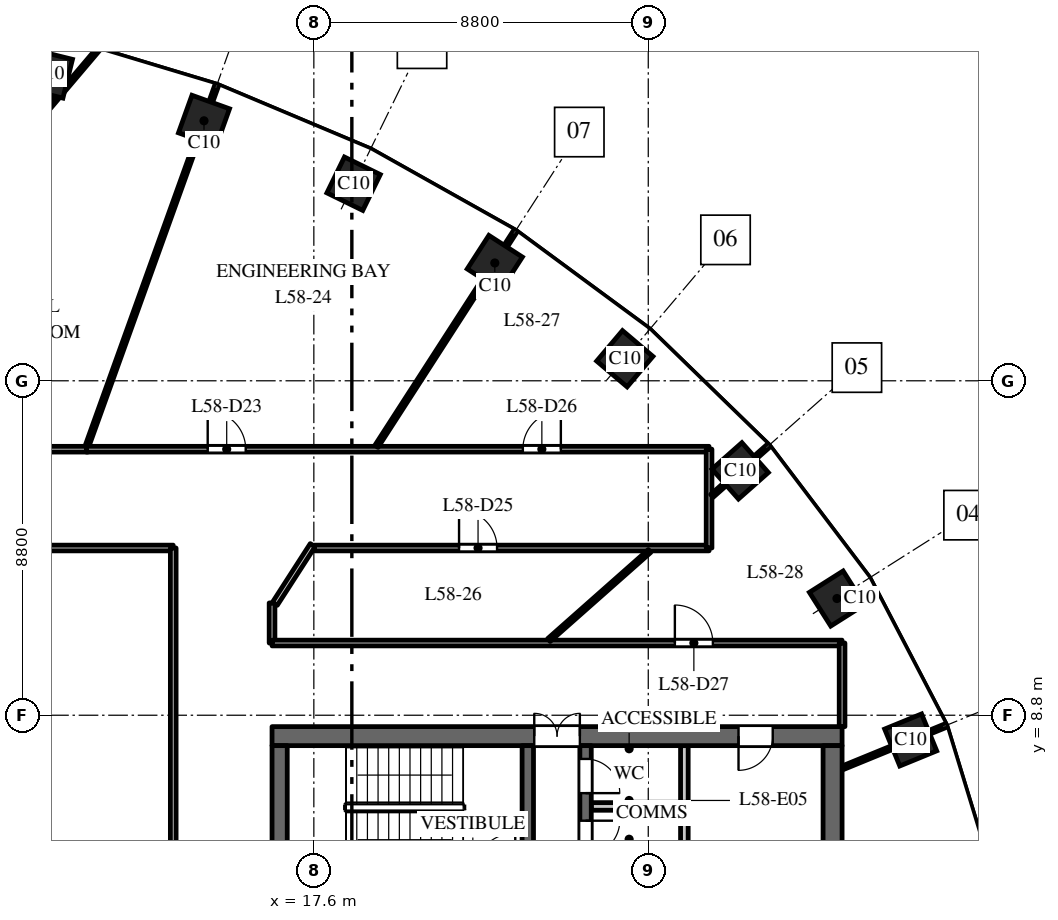
"""IFC4 building model, lengths in metres.
Left out: names, types, materials, properties, quantities, classifications, styles, units other than length and angle.
Written with IfcOpenShell. Run it as: python <this file> out.ifc"""

import sys

from ifc_helpers import new_model, si_unit, direction, frame, frame_2d, origin, origin_2d, place, context, subcontext, project, spatial, rectangle, extrude, element, fill, save


model = new_model("IFC4")
c1 = context("Model", 3, precision=1e-05, world=origin(), true_north=direction((0.0, 1.0)))
c2 = subcontext(c1, "Body", "Model", "MODEL_VIEW")
j1 = project(units=[si_unit("LENGTHUNIT", "METRE"), si_unit("PLANEANGLEUNIT", "RADIAN")], contexts=[c1])
p1 = place(None, origin())
s1 = spatial("IfcSite", under=j1, at=p1, CompositionType="ELEMENT")
p2 = place(p1, origin())
s2 = spatial("IfcBuilding", under=s1, at=p2, CompositionType="ELEMENT")
p3 = place(p2, frame((0.0, 0.0, 273.5)))
s3 = spatial("IfcBuildingStorey", under=s2, at=p3, CompositionType="ELEMENT", Elevation=273.5)
for number, where, z_axis, x_axis in (
    (1, (33.305, 8.149, 0.0), (0.0, 0.0, 1.0), (-0.379, 0.925, 0.0)),
    (2, (31.365, 11.871, 0.0), (0.0, 0.0, 1.0), (-0.535, 0.845, 0.0)),
    (3, (28.819, 15.23, 0.0), (0.0, 0.0, 1.0), (-0.663, 0.749, 0.0)),
    (4, (25.783, 18.18, 0.0), (0.0, 0.0, 1.0), (-0.763, 0.646, 0.0)),
    (5, (22.362, 20.7, 0.0), (0.0, 0.0, 1.0), (-0.84, 0.542, 0.0)),
    (6, (18.646, 22.785, 0.0), (0.0, 0.0, 1.0), (-0.898, 0.439, 0.0)),
    (7, (14.709, 24.441, 0.0), (0.0, 0.0, 1.0), (-0.941, 0.338, 0.0)),
    (8, (10.613, 25.674, 0.0), (0.0, 0.0, 1.0), (-0.971, 0.24, 0.0)),
):
    element("IfcColumn", number, at=place(p3, frame(where, z_axis=z_axis, x_axis=x_axis)), inside=s3, PredefinedType="COLUMN", context=c2, shape_type="SweptSolid", body=[
        extrude(rectangle(XDim=1.05, YDim=1.05, at=origin_2d()), origin(), (0.0, 0.0, 1.0), 4.0),
    ])
p4 = place(p3, frame((16.5, 8.25, 0.0), z_axis=(0.0, 0.0, 1.0), x_axis=(1.0, 0.0, 0.0)))
e9 = element("IfcWall", 9, at=p4, inside=s3, PredefinedType="SHEAR", context=c2, shape_type="SweptSolid", body=[
    extrude(rectangle(XDim=15.0, YDim=0.5, at=frame_2d((7.5, 0.0))), origin(), (0.0, 0.0, 1.0), 3.7),
])
p5 = place(p4, frame((6.9, 0.0, 0.0)))
e10 = element("IfcOpeningElement", 10, at=p5, cuts=e9, PredefinedType="OPENING", context=c2, shape_type="SweptSolid", body=[
    extrude(rectangle(XDim=1.2, YDim=2.1, at=frame_2d((0.6, 1.05))), frame((0.0, 0.26, 0.0), z_axis=(0.0, -1.0, 0.0), x_axis=(1.0, 0.0, 0.0)), (0.0, 0.0, 1.0), 0.52),
])
p6 = place(p4, frame((12.275, 0.0, 0.0)))
e11 = element("IfcOpeningElement", 11, at=p6, cuts=e9, PredefinedType="OPENING", context=c2, shape_type="SweptSolid", body=[
    extrude(rectangle(XDim=0.9, YDim=2.1, at=frame_2d((0.45, 1.05))), frame((0.0, 0.26, 0.0), z_axis=(0.0, -1.0, 0.0), x_axis=(1.0, 0.0, 0.0)), (0.0, 0.0, 1.0), 0.52),
])
p7 = place(p3, frame((24.75, -8.0, 0.0), z_axis=(0.0, 0.0, 1.0), x_axis=(0.0, 1.0, 0.0)))
e12 = element("IfcWall", 12, at=p7, inside=s3, PredefinedType="SHEAR", context=c2, shape_type="SweptSolid", body=[
    extrude(rectangle(XDim=16.0, YDim=0.3, at=frame_2d((8.0, 0.0))), origin(), (0.0, 0.0, 1.0), 3.7),
])
p8 = place(p7, frame((4.425, 0.0, 0.0)))
e13 = element("IfcOpeningElement", 13, at=p8, cuts=e12, PredefinedType="OPENING", context=c2, shape_type="SweptSolid", body=[
    extrude(rectangle(XDim=1.1, YDim=2.1, at=frame_2d((0.55, 1.05))), frame((0.0, 0.16, 0.0), z_axis=(0.0, -1.0, 0.0), x_axis=(1.0, 0.0, 0.0)), (0.0, 0.0, 1.0), 0.32),
])
p9 = place(p7, frame((7.45, 0.0, 0.0)))
e14 = element("IfcOpeningElement", 14, at=p9, cuts=e12, PredefinedType="OPENING", context=c2, shape_type="SweptSolid", body=[
    extrude(rectangle(XDim=1.1, YDim=2.1, at=frame_2d((0.55, 1.05))), frame((0.0, 0.16, 0.0), z_axis=(0.0, -1.0, 0.0), x_axis=(1.0, 0.0, 0.0)), (0.0, 0.0, 1.0), 0.32),
])
p10 = place(p7, frame((10.475, 0.0, 0.0)))
e15 = element("IfcOpeningElement", 15, at=p10, cuts=e12, PredefinedType="OPENING", context=c2, shape_type="SweptSolid", body=[
    extrude(rectangle(XDim=1.1, YDim=2.1, at=frame_2d((0.55, 1.05))), frame((0.0, 0.16, 0.0), z_axis=(0.0, -1.0, 0.0), x_axis=(1.0, 0.0, 0.0)), (0.0, 0.0, 1.0), 0.32),
])
p11 = place(p7, frame((13.125, 0.0, 0.0)))
e16 = element("IfcOpeningElement", 16, at=p11, cuts=e12, PredefinedType="OPENING", context=c2, shape_type="SweptSolid", body=[
    extrude(rectangle(XDim=0.9, YDim=2.1, at=frame_2d((0.45, 1.05))), frame((0.0, 0.16, 0.0), z_axis=(0.0, -1.0, 0.0), x_axis=(1.0, 0.0, 0.0)), (0.0, 0.0, 1.0), 0.32),
])
p12 = place(p7, frame((14.75, 0.0, 0.0)))
e17 = element("IfcOpeningElement", 17, at=p12, cuts=e12, PredefinedType="OPENING", context=c2, shape_type="SweptSolid", body=[
    extrude(rectangle(XDim=0.9, YDim=2.1, at=frame_2d((0.45, 1.05))), frame((0.0, 0.16, 0.0), z_axis=(0.0, -1.0, 0.0), x_axis=(1.0, 0.0, 0.0)), (0.0, 0.0, 1.0), 0.32),
])
p13 = place(p7, frame((1.35, 0.0, 0.0)))
e18 = element("IfcOpeningElement", 18, at=p13, cuts=e12, PredefinedType="OPENING", context=c2, shape_type="SweptSolid", body=[
    extrude(rectangle(XDim=0.9, YDim=2.1, at=frame_2d((0.45, 1.05))), frame((0.0, 0.16, 0.0), z_axis=(0.0, -1.0, 0.0), x_axis=(1.0, 0.0, 0.0)), (0.0, 0.0, 1.0), 0.32),
])
p14 = place(p3, frame((16.7, -8.0, 0.0), z_axis=(0.0, 0.0, 1.0), x_axis=(0.0, 1.0, 0.0)))
e19 = element("IfcWall", 19, at=p14, inside=s3, PredefinedType="SHEAR", context=c2, shape_type="SweptSolid", body=[
    extrude(rectangle(XDim=16.0, YDim=0.4, at=frame_2d((8.0, 0.0))), origin(), (0.0, 0.0, 1.0), 3.7),
])
p15 = place(p3, frame((31.25, -8.0, 0.0), z_axis=(0.0, 0.0, 1.0), x_axis=(0.0, 1.0, 0.0)))
e20 = element("IfcWall", 20, at=p15, inside=s3, PredefinedType="SHEAR", context=c2, shape_type="SweptSolid", body=[
    extrude(rectangle(XDim=16.0, YDim=0.5, at=frame_2d((8.0, 0.0))), origin(), (0.0, 0.0, 1.0), 3.7),
])
p16 = place(p3, frame((27.35, 4.75, 0.0), z_axis=(0.0, 0.0, 1.0), x_axis=(0.0, 1.0, 0.0)))
e21 = element("IfcWall", 21, at=p16, inside=s3, PredefinedType="PARTITIONING", context=c2, shape_type="SweptSolid", body=[
    extrude(rectangle(XDim=3.25, YDim=0.2, at=frame_2d((1.625, 0.0))), origin(), (0.0, 0.0, 1.0), 3.7),
])
p17 = place(p3, frame((24.9, 6.4, 0.0), z_axis=(0.0, 0.0, 1.0), x_axis=(1.0, 0.0, 0.0)))
e22 = element("IfcWall", 22, at=p17, inside=s3, PredefinedType="PARTITIONING", context=c2, shape_type="SweptSolid", body=[
    extrude(rectangle(XDim=2.35, YDim=0.2, at=frame_2d((1.175, 0.0))), origin(), (0.0, 0.0, 1.0), 3.7),
])
p18 = place(p3, frame((23.23, 2.25, 0.0), z_axis=(0.0, 0.0, 1.0), x_axis=(0.0, 1.0, 0.0)))
e23 = element("IfcWall", 23, at=p18, inside=s3, PredefinedType="SHEAR", context=c2, shape_type="SweptSolid", body=[
    extrude(rectangle(XDim=5.75, YDim=0.3, at=frame_2d((2.875, 0.0))), origin(), (0.0, 0.0, 1.0), 3.7),
])
p19 = place(p18, frame((0.6, 0.0, 0.0)))
e24 = element("IfcOpeningElement", 24, at=p19, cuts=e23, PredefinedType="OPENING", context=c2, shape_type="SweptSolid", body=[
    extrude(rectangle(XDim=1.0, YDim=2.1, at=frame_2d((0.5, 1.05))), frame((0.0, 0.16, 0.0), z_axis=(0.0, -1.0, 0.0), x_axis=(1.0, 0.0, 0.0)), (0.0, 0.0, 1.0), 0.32),
])
p20 = place(p3, frame((-13.9, 13.2, 0.0), z_axis=(0.0, 0.0, 1.0), x_axis=(1.0, 0.0, 0.0)))
e25 = element("IfcWall", 25, at=p20, inside=s3, PredefinedType="PARTITIONING", context=c2, shape_type="SweptSolid", body=[
    extrude(rectangle(XDim=27.8, YDim=0.15, at=frame_2d((13.9, 0.0))), origin(), (0.0, 0.0, 1.0), 2.85),
])
p21 = place(p20, frame((11.63, 0.0, 0.0)))
e26 = element("IfcOpeningElement", 26, at=p21, cuts=e25, PredefinedType="OPENING", context=c2, shape_type="SweptSolid", body=[
    extrude(rectangle(XDim=1.0, YDim=2.1, at=frame_2d((0.5, 1.05))), frame((0.0, 0.085, 0.0), z_axis=(0.0, -1.0, 0.0), x_axis=(1.0, 0.0, 0.0)), (0.0, 0.0, 1.0), 0.17),
])
p22 = place(p20, frame((16.263, 0.0, 0.0)))
e27 = element("IfcOpeningElement", 27, at=p22, cuts=e25, PredefinedType="OPENING", context=c2, shape_type="SweptSolid", body=[
    extrude(rectangle(XDim=1.0, YDim=2.1, at=frame_2d((0.5, 1.05))), frame((0.0, 0.085, 0.0), z_axis=(0.0, -1.0, 0.0), x_axis=(1.0, 0.0, 0.0)), (0.0, 0.0, 1.0), 0.17),
])
p23 = place(p20, frame((20.897, 0.0, 0.0)))
e28 = element("IfcOpeningElement", 28, at=p23, cuts=e25, PredefinedType="OPENING", context=c2, shape_type="SweptSolid", body=[
    extrude(rectangle(XDim=1.0, YDim=2.1, at=frame_2d((0.5, 1.05))), frame((0.0, 0.085, 0.0), z_axis=(0.0, -1.0, 0.0), x_axis=(1.0, 0.0, 0.0)), (0.0, 0.0, 1.0), 0.17),
])
p24 = place(p3, frame((-8.174, 15.8, 0.0), z_axis=(0.0, 0.0, 1.0), x_axis=(1.0, 0.0, 0.0)))
e29 = element("IfcWall", 29, at=p24, inside=s3, PredefinedType="PARTITIONING", context=c2, shape_type="SweptSolid", body=[
    extrude(rectangle(XDim=19.829, YDim=0.15, at=frame_2d((9.915, 0.0))), origin(), (0.0, 0.0, 1.0), 2.85),
])
p25 = place(p24, frame((3.422, 0.0, 0.0)))
e30 = element("IfcOpeningElement", 30, at=p25, cuts=e29, PredefinedType="OPENING", context=c2, shape_type="SweptSolid", body=[
    extrude(rectangle(XDim=1.0, YDim=2.1, at=frame_2d((0.5, 1.05))), frame((0.0, 0.085, 0.0), z_axis=(0.0, -1.0, 0.0), x_axis=(1.0, 0.0, 0.0)), (0.0, 0.0, 1.0), 0.17),
])
p26 = place(p24, frame((9.039, 0.0, 0.0)))
e31 = element("IfcOpeningElement", 31, at=p26, cuts=e29, PredefinedType="OPENING", context=c2, shape_type="SweptSolid", body=[
    extrude(rectangle(XDim=1.0, YDim=2.1, at=frame_2d((0.5, 1.05))), frame((0.0, 0.085, 0.0), z_axis=(0.0, -1.0, 0.0), x_axis=(1.0, 0.0, 0.0)), (0.0, 0.0, 1.0), 0.17),
])
p27 = place(p24, frame((14.888, 0.0, 0.0)))
e32 = element("IfcOpeningElement", 32, at=p27, cuts=e29, PredefinedType="OPENING", context=c2, shape_type="SweptSolid", body=[
    extrude(rectangle(XDim=1.0, YDim=2.1, at=frame_2d((0.5, 1.05))), frame((0.0, 0.085, 0.0), z_axis=(0.0, -1.0, 0.0), x_axis=(1.0, 0.0, 0.0)), (0.0, 0.0, 1.0), 0.17),
])
p28 = place(p3, frame((3.075, 15.878, 0.0), z_axis=(0.0, 0.0, 1.0), x_axis=(0.64645132614, 0.762955229966, 0.0)))
e33 = element("IfcWall", 33, at=p28, inside=s3, PredefinedType="PARTITIONING", context=c2, shape_type="SweptSolid", body=[
    extrude(rectangle(XDim=13.69, YDim=0.1, at=frame_2d((6.845, 0.0))), origin(), (0.0, 0.0, 1.0), 2.85),
])
p29 = place(p3, frame((11.629, 15.875, 0.0), z_axis=(0.0, 0.0, 1.0), x_axis=(0.338394316696, 0.94100440298, 0.0)))
e34 = element("IfcWall", 34, at=p29, inside=s3, PredefinedType="PARTITIONING", context=c2, shape_type="SweptSolid", body=[
    extrude(rectangle(XDim=10.104, YDim=0.1, at=frame_2d((5.052, 0.0))), origin(), (0.0, 0.0, 1.0), 2.85),
])
p30 = place(p3, frame((11.614, 15.8, 0.0), z_axis=(0.0, 0.0, 1.0), x_axis=(1.0, 0.0, 0.0)))
e35 = element("IfcWall", 35, at=p30, inside=s3, PredefinedType="PARTITIONING", context=c2, shape_type="SweptSolid", body=[
    extrude(rectangle(XDim=16.386, YDim=0.15, at=frame_2d((8.193, 0.0))), origin(), (0.0, 0.0, 1.0), 3.0),
])
p31 = place(p30, frame((3.193, 0.0, 0.0)))
e36 = element("IfcOpeningElement", 36, at=p31, cuts=e35, PredefinedType="OPENING", context=c2, shape_type="SweptSolid", body=[
    extrude(rectangle(XDim=1.0, YDim=2.1, at=frame_2d((0.5, 1.05))), frame((0.0, 0.085, 0.0), z_axis=(0.0, -1.0, 0.0), x_axis=(1.0, 0.0, 0.0)), (0.0, 0.0, 1.0), 0.17),
])
p32 = place(p30, frame((11.486, 0.0, 0.0)))
e37 = element("IfcOpeningElement", 37, at=p32, cuts=e35, PredefinedType="OPENING", context=c2, shape_type="SweptSolid", body=[
    extrude(rectangle(XDim=1.0, YDim=2.1, at=frame_2d((0.5, 1.05))), frame((0.0, 0.085, 0.0), z_axis=(0.0, -1.0, 0.0), x_axis=(1.0, 0.0, 0.0)), (0.0, 0.0, 1.0), 0.17),
])
p33 = place(p3, frame((13.9, -13.2, 0.0), z_axis=(0.0, 0.0, 1.0), x_axis=(0.0, 1.0, 0.0)))
e38 = element("IfcWall", 38, at=p33, inside=s3, PredefinedType="PARTITIONING", context=c2, shape_type="SweptSolid", body=[
    extrude(rectangle(XDim=26.4, YDim=0.15, at=frame_2d((13.2, 0.0))), origin(), (0.0, 0.0, 1.0), 2.75),
])
p34 = place(p33, frame((12.75, 0.0, 0.0)))
e39 = element("IfcOpeningElement", 39, at=p34, cuts=e38, PredefinedType="OPENING", context=c2, shape_type="SweptSolid", body=[
    extrude(rectangle(XDim=1.0, YDim=2.1, at=frame_2d((0.5, 1.05))), frame((0.0, 0.085, 0.0), z_axis=(0.0, -1.0, 0.0), x_axis=(1.0, 0.0, 0.0)), (0.0, 0.0, 1.0), 0.17),
])
p35 = place(p3, frame((16.5, 10.7, 0.0), z_axis=(0.0, 0.0, 1.0), x_axis=(0.0, 1.0, 0.0)))
e40 = element("IfcWall", 40, at=p35, inside=s3, PredefinedType="PARTITIONING", context=c2, shape_type="SweptSolid", body=[
    extrude(rectangle(XDim=1.055, YDim=0.15, at=frame_2d((0.527, 0.0))), origin(), (0.0, 0.0, 1.0), 3.7),
])
p36 = place(p3, frame((16.5, 10.7, 0.0), z_axis=(0.0, 0.0, 1.0), x_axis=(1.0, 0.0, 0.0)))
e41 = element("IfcWall", 41, at=p36, inside=s3, PredefinedType="PARTITIONING", context=c2, shape_type="SweptSolid", body=[
    extrude(rectangle(XDim=15.0, YDim=0.15, at=frame_2d((7.5, 0.0))), origin(), (0.0, 0.0, 1.0), 2.75),
])
p37 = place(p36, frame((10.6, 0.0, 0.0)))
e42 = element("IfcOpeningElement", 42, at=p37, cuts=e41, PredefinedType="OPENING", context=c2, shape_type="SweptSolid", body=[
    extrude(rectangle(XDim=1.0, YDim=2.1, at=frame_2d((0.5, 1.05))), frame((0.0, 0.085, 0.0), z_axis=(0.0, -1.0, 0.0), x_axis=(1.0, 0.0, 0.0)), (0.0, 0.0, 1.0), 0.17),
])
p38 = place(p3, frame((16.575, 11.733, 0.0), z_axis=(0.0, 0.0, 1.0), x_axis=(0.541860116324, 0.840468687304, 0.0)))
e43 = element("IfcWall", 43, at=p38, inside=s3, PredefinedType="PARTITIONING", context=c2, shape_type="SweptSolid", body=[
    extrude(rectangle(XDim=1.835, YDim=0.15, at=frame_2d((0.917, 0.0))), origin(), (0.0, 0.0, 1.0), 3.7),
])
p39 = place(p3, frame((17.61, 13.2, 0.0), z_axis=(0.0, 0.0, 1.0), x_axis=(1.0, 0.0, 0.0)))
e44 = element("IfcWall", 44, at=p39, inside=s3, PredefinedType="PARTITIONING", context=c2, shape_type="SweptSolid", body=[
    extrude(rectangle(XDim=10.39, YDim=0.15, at=frame_2d((5.195, 0.0))), origin(), (0.0, 0.0, 1.0), 2.75),
])
p40 = place(p39, frame((3.811, 0.0, 0.0)))
e45 = element("IfcOpeningElement", 45, at=p40, cuts=e44, PredefinedType="OPENING", context=c2, shape_type="SweptSolid", body=[
    extrude(rectangle(XDim=1.0, YDim=2.1, at=frame_2d((0.5, 1.05))), frame((0.0, 0.085, 0.0), z_axis=(0.0, -1.0, 0.0), x_axis=(1.0, 0.0, 0.0)), (0.0, 0.0, 1.0), 0.17),
])
p41 = place(p3, frame((19.248, 15.875, 0.0), z_axis=(0.0, 0.0, 1.0), x_axis=(0.542216737844, 0.840238662049, 0.0)))
e46 = element("IfcWall", 46, at=p41, inside=s3, PredefinedType="PARTITIONING", context=c2, shape_type="SweptSolid", body=[
    extrude(rectangle(XDim=6.744, YDim=0.1, at=frame_2d((3.372, 0.0))), origin(), (0.0, 0.0, 1.0), 3.7),
])
p42 = place(p3, frame((23.785, 10.778, 0.0), z_axis=(0.0, 0.0, 1.0), x_axis=(0.749047927355, 0.662515813038, 0.0)))
e47 = element("IfcWall", 47, at=p42, inside=s3, PredefinedType="PARTITIONING", context=c2, shape_type="SweptSolid", body=[
    extrude(rectangle(XDim=3.538, YDim=0.1, at=frame_2d((1.769, 0.0))), origin(), (0.0, 0.0, 1.0), 3.7),
])
p43 = place(p3, frame((28.0, 13.2, 0.0), z_axis=(0.0, 0.0, 1.0), x_axis=(0.0, 1.0, 0.0)))
e48 = element("IfcWall", 48, at=p43, inside=s3, PredefinedType="PARTITIONING", context=c2, shape_type="SweptSolid", body=[
    extrude(rectangle(XDim=2.6, YDim=0.15, at=frame_2d((1.3, 0.0))), origin(), (0.0, 0.0, 1.0), 2.75),
])
p44 = place(p3, frame((28.075, 14.572, 0.0), z_axis=(0.0, 0.0, 1.0), x_axis=(0.748683588402, 0.662927510711, 0.0)))
e49 = element("IfcWall", 49, at=p44, inside=s3, PredefinedType="PARTITIONING", context=c2, shape_type="SweptSolid", body=[
    extrude(rectangle(XDim=1.996, YDim=0.1, at=frame_2d((0.998, 0.0))), origin(), (0.0, 0.0, 1.0), 2.75),
])
p45 = place(p3, frame((31.5, 7.41, 0.0), z_axis=(0.0, 0.0, 1.0), x_axis=(0.925344112436, 0.379128307542, 0.0)))
e50 = element("IfcWall", 50, at=p45, inside=s3, PredefinedType="PARTITIONING", context=c2, shape_type="SweptSolid", body=[
    extrude(rectangle(XDim=2.954, YDim=0.1, at=frame_2d((1.477, 0.0))), origin(), (0.0, 0.0, 1.0), 3.2),
])
p46 = place(p3, frame((31.5, 8.5, 0.0), z_axis=(0.0, 0.0, 1.0), x_axis=(0.0, 1.0, 0.0)))
e51 = element("IfcWall", 51, at=p46, inside=s3, PredefinedType="PARTITIONING", context=c2, shape_type="SweptSolid", body=[
    extrude(rectangle(XDim=2.2, YDim=0.15, at=frame_2d((1.1, 0.0))), origin(), (0.0, 0.0, 1.0), 3.0),
])
p47 = place(p5, origin())
e52 = element("IfcDoor", 52, at=p47, inside=s3, OperationType="DOUBLE_DOOR_DOUBLE_SWING", PredefinedType="DOOR", context=c2, shape_type="SweptSolid", body=[
    extrude(rectangle(XDim=1.2, YDim=2.1, at=frame_2d((0.6, 1.05))), frame((0.0, 0.025, 0.0), z_axis=(0.0, -1.0, 0.0), x_axis=(1.0, 0.0, 0.0)), (0.0, 0.0, 1.0), 0.05),
])
fill(e10, e52)
p48 = place(p11, origin())
e53 = element("IfcDoor", 53, at=p48, inside=s3, OperationType="SINGLE_SWING_RIGHT", PredefinedType="DOOR", context=c2, shape_type="SweptSolid", body=[
    extrude(rectangle(XDim=0.9, YDim=2.1, at=frame_2d((0.45, 1.05))), frame((0.0, 0.025, 0.0), z_axis=(0.0, -1.0, 0.0), x_axis=(1.0, 0.0, 0.0)), (0.0, 0.0, 1.0), 0.05),
])
fill(e16, e53)
p49 = place(p12, origin())
e54 = element("IfcDoor", 54, at=p49, inside=s3, OperationType="SINGLE_SWING_LEFT", PredefinedType="DOOR", context=c2, shape_type="SweptSolid", body=[
    extrude(rectangle(XDim=0.9, YDim=2.1, at=frame_2d((0.45, 1.05))), frame((0.0, 0.025, 0.0), z_axis=(0.0, -1.0, 0.0), x_axis=(1.0, 0.0, 0.0)), (0.0, 0.0, 1.0), 0.05),
])
fill(e17, e54)
p50 = place(p6, origin())
e55 = element("IfcDoor", 55, at=p50, inside=s3, OperationType="SINGLE_SWING_LEFT", PredefinedType="DOOR", context=c2, shape_type="SweptSolid", body=[
    extrude(rectangle(XDim=0.9, YDim=2.1, at=frame_2d((0.45, 1.05))), frame((0.0, 0.025, 0.0), z_axis=(0.0, -1.0, 0.0), x_axis=(1.0, 0.0, 0.0)), (0.0, 0.0, 1.0), 0.05),
])
fill(e11, e55)
p51 = place(p31, origin())
e56 = element("IfcDoor", 56, at=p51, inside=s3, OperationType="SINGLE_SWING_LEFT", PredefinedType="DOOR", context=c2, shape_type="SweptSolid", body=[
    extrude(rectangle(XDim=1.0, YDim=2.1, at=frame_2d((0.5, 1.05))), frame((0.0, 0.025, 0.0), z_axis=(0.0, -1.0, 0.0), x_axis=(1.0, 0.0, 0.0)), (0.0, 0.0, 1.0), 0.05),
])
fill(e36, e56)
p52 = place(p40, origin())
e57 = element("IfcDoor", 57, at=p52, inside=s3, OperationType="SINGLE_SWING_LEFT", PredefinedType="DOOR", context=c2, shape_type="SweptSolid", body=[
    extrude(rectangle(XDim=1.0, YDim=2.1, at=frame_2d((0.5, 1.05))), frame((0.0, 0.025, 0.0), z_axis=(0.0, -1.0, 0.0), x_axis=(1.0, 0.0, 0.0)), (0.0, 0.0, 1.0), 0.05),
])
fill(e45, e57)
p53 = place(p32, origin())
e58 = element("IfcDoor", 58, at=p53, inside=s3, OperationType="SINGLE_SWING_RIGHT", PredefinedType="DOOR", context=c2, shape_type="SweptSolid", body=[
    extrude(rectangle(XDim=1.0, YDim=2.1, at=frame_2d((0.5, 1.05))), frame((0.0, 0.025, 0.0), z_axis=(0.0, -1.0, 0.0), x_axis=(1.0, 0.0, 0.0)), (0.0, 0.0, 1.0), 0.05),
])
fill(e37, e58)
p54 = place(p37, origin())
e59 = element("IfcDoor", 59, at=p54, inside=s3, OperationType="SINGLE_SWING_LEFT", PredefinedType="DOOR", context=c2, shape_type="SweptSolid", body=[
    extrude(rectangle(XDim=1.0, YDim=2.1, at=frame_2d((0.5, 1.05))), frame((0.0, 0.025, 0.0), z_axis=(0.0, -1.0, 0.0), x_axis=(1.0, 0.0, 0.0)), (0.0, 0.0, 1.0), 0.05),
])
fill(e42, e59)
save(model, sys.argv[1])
